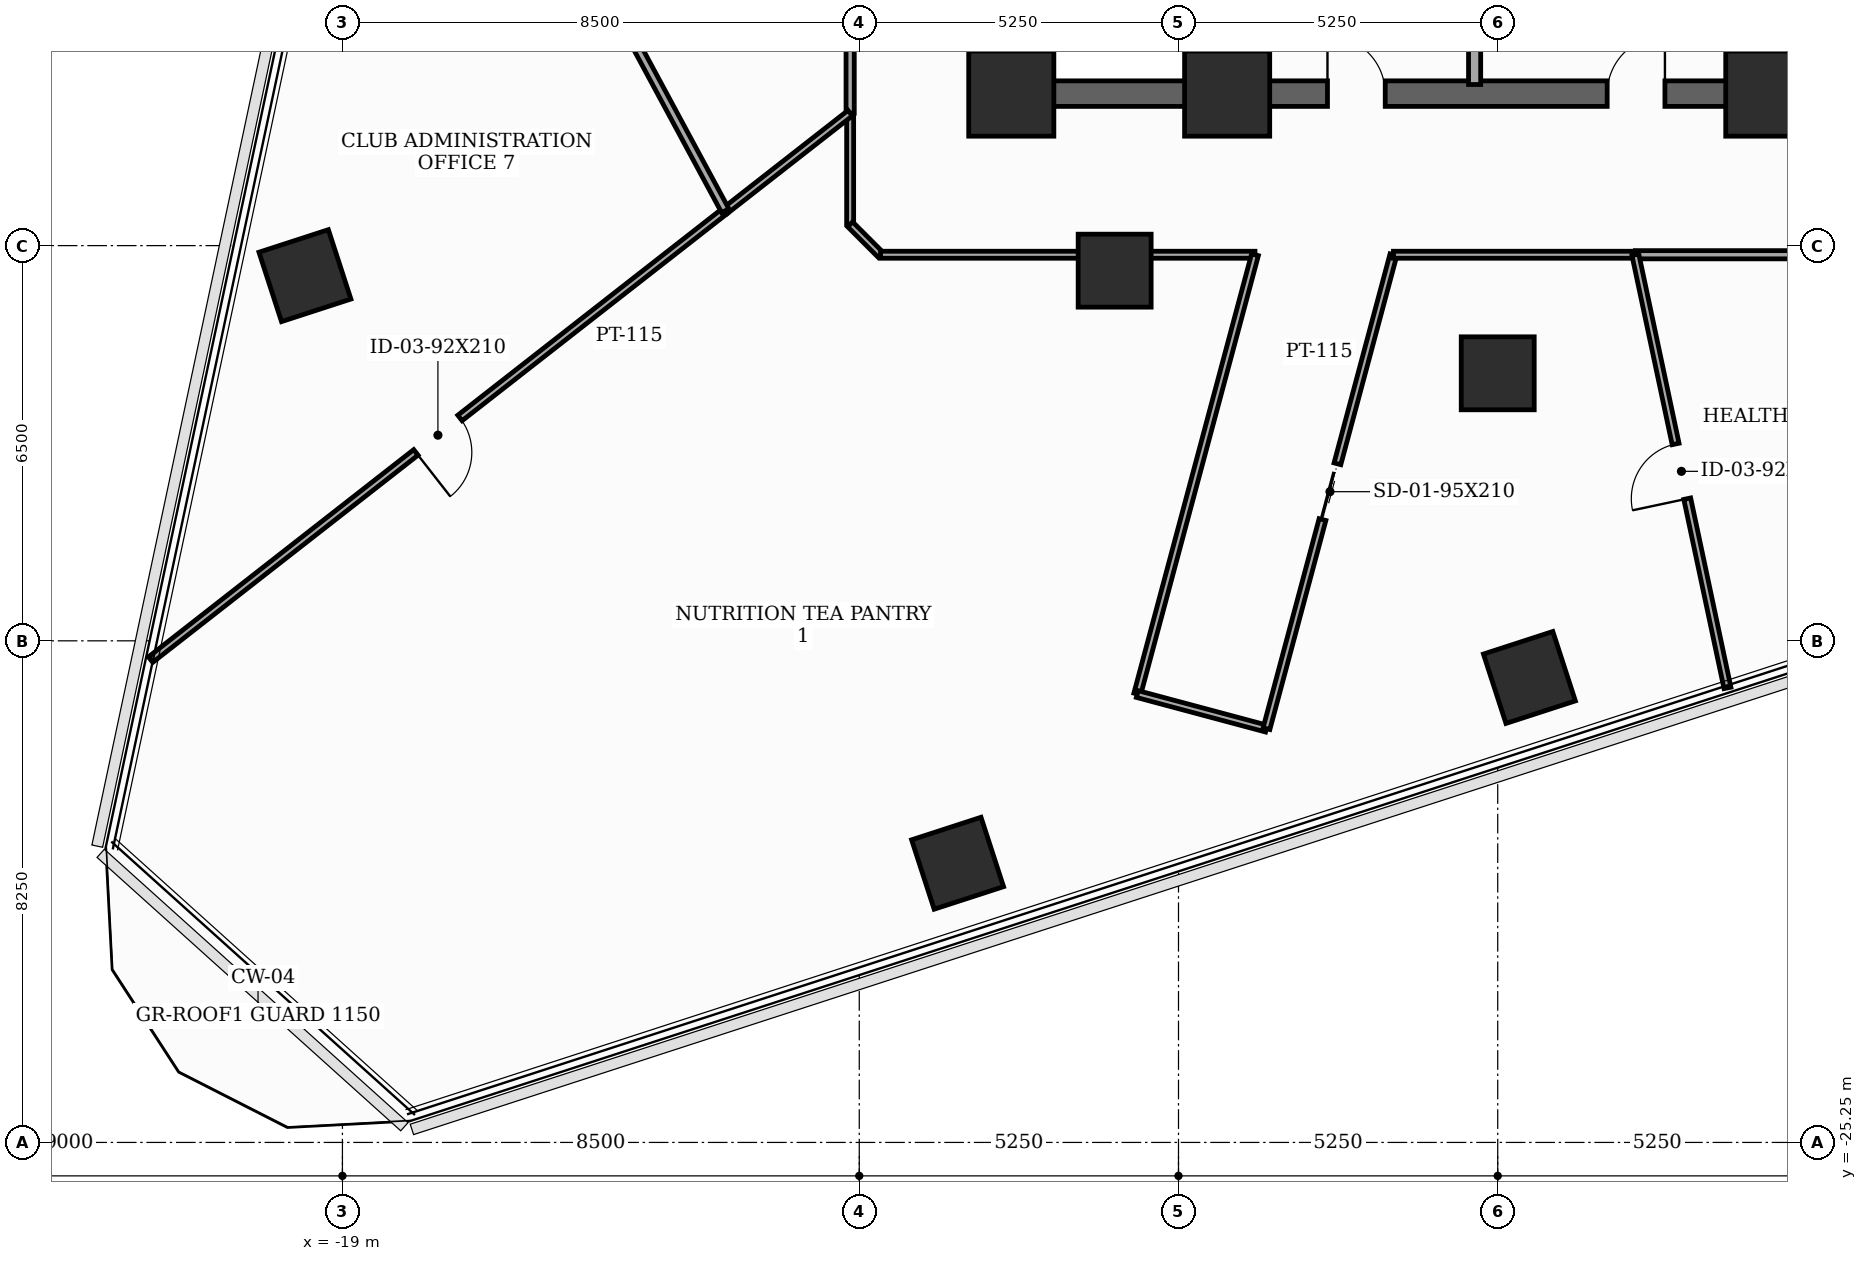
"""IFC4 building model, lengths in metres.
Left out: names, types, materials, properties, quantities, classifications, styles, units other than length and angle.
Written with IfcOpenShell. Run it as: python <this file> out.ifc"""

import sys

from ifc_helpers import new_model, si_unit, direction, frame, frame_2d, origin, origin_2d, place, context, subcontext, project, spatial, rectangle, extrude, element, fill, save


model = new_model("IFC4")
c1 = context("Model", 3, precision=1e-05, world=origin(), true_north=direction((0.0, 1.0)))
c2 = subcontext(c1, "Body", "Model", "MODEL_VIEW")
j1 = project(units=[si_unit("LENGTHUNIT", "METRE"), si_unit("PLANEANGLEUNIT", "RADIAN")], contexts=[c1])
p1 = place(None, origin())
s1 = spatial("IfcSite", under=j1, at=p1, CompositionType="ELEMENT")
p2 = place(p1, origin())
s2 = spatial("IfcBuilding", under=s1, at=p2, CompositionType="ELEMENT")
p3 = place(p2, frame((0.0, 0.0, 101.4)))
s3 = spatial("IfcBuildingStorey", under=s2, at=p3, CompositionType="ELEMENT", Elevation=101.4)
for number, where, z_axis, x_axis in (
    (1, (-8.0, -8.0, 0.0), (0.0, 0.0, 1.0), (1.0, 0.0, 0.0)),
    (2, (-4.45, -8.0, 0.0), (0.0, 0.0, 1.0), (1.0, 0.0, 0.0)),
    (3, (4.45, -8.0, 0.0), (0.0, 0.0, 1.0), (1.0, 0.0, 0.0)),
):
    element("IfcColumn", number, at=place(p3, frame(where, z_axis=z_axis, x_axis=x_axis)), inside=s3, PredefinedType="COLUMN", context=c2, shape_type="SweptSolid", body=[
        extrude(rectangle(XDim=1.4, YDim=1.4, at=origin_2d()), origin(), (0.0, 0.0, 1.0), 3.7),
    ])
for number, where, z_axis, x_axis in (
    (4, (-6.3, -10.912, 0.0), (0.0, 0.0, 1.0), (1.0, 0.0, 0.0)),
    (5, (0.0, -12.6, 0.0), (0.0, 0.0, 1.0), (1.0, 0.0, 0.0)),
    (6, (-8.883, -20.658, 0.0), (0.0, 0.0, 1.0), (0.951, 0.309, 0.0)),
    (7, (0.521, -17.603, 0.0), (0.0, 0.0, 1.0), (0.951, 0.309, 0.0)),
    (8, (-19.616, -10.994, 0.0), (0.0, 0.0, 1.0), (0.951, 0.309, 0.0)),
):
    element("IfcColumn", number, at=place(p3, frame(where, z_axis=z_axis, x_axis=x_axis)), inside=s3, PredefinedType="COLUMN", context=c2, shape_type="SweptSolid", body=[
        extrude(rectangle(XDim=1.2, YDim=1.2, at=origin_2d()), origin(), (0.0, 0.0, 1.0), 3.7),
    ])
p4 = place(p3, frame((-8.0, -8.0, 0.0), z_axis=(0.0, 0.0, 1.0), x_axis=(0.0, 1.0, 0.0)))
e9 = element("IfcWall", 9, at=p4, inside=s3, PredefinedType="SHEAR", context=c2, shape_type="SweptSolid", body=[
    extrude(rectangle(XDim=16.0, YDim=0.42, at=frame_2d((8.0, 0.0))), origin(), (0.0, 0.0, 1.0), 3.5),
])
p5 = place(p4, frame((0.922, 0.0, 0.0)))
e10 = element("IfcOpeningElement", 10, at=p5, cuts=e9, PredefinedType="OPENING", context=c2, shape_type="SweptSolid", body=[
    extrude(rectangle(XDim=0.85, YDim=2.02, at=frame_2d((0.425, 1.01))), frame((0.0, 0.22, 0.0), z_axis=(0.0, -1.0, 0.0), x_axis=(1.0, 0.0, 0.0)), (0.0, 0.0, 1.0), 0.44),
])
p6 = place(p4, frame((5.35, 0.0, 0.0)))
e11 = element("IfcOpeningElement", 11, at=p6, cuts=e9, PredefinedType="OPENING", context=c2, shape_type="SweptSolid", body=[
    extrude(rectangle(XDim=1.05, YDim=2.15, at=frame_2d((0.525, 1.075))), frame((0.0, 0.22, 0.0), z_axis=(0.0, -1.0, 0.0), x_axis=(1.0, 0.0, 0.0)), (0.0, 0.0, 1.0), 0.44),
])
p7 = place(p3, frame((-8.0, -8.0, 0.0), z_axis=(0.0, 0.0, 1.0), x_axis=(1.0, 0.0, 0.0)))
e12 = element("IfcWall", 12, at=p7, inside=s3, PredefinedType="SHEAR", context=c2, shape_type="SweptSolid", body=[
    extrude(rectangle(XDim=16.0, YDim=0.42, at=frame_2d((8.0, 0.0))), origin(), (0.0, 0.0, 1.0), 3.5),
])
p8 = place(p7, frame((5.2, 0.0, 0.0)))
e13 = element("IfcOpeningElement", 13, at=p8, cuts=e12, PredefinedType="OPENING", context=c2, shape_type="SweptSolid", body=[
    extrude(rectangle(XDim=0.95, YDim=2.1, at=frame_2d((0.475, 1.05))), frame((0.0, 0.22, 0.0), z_axis=(0.0, -1.0, 0.0), x_axis=(1.0, 0.0, 0.0)), (0.0, 0.0, 1.0), 0.44),
])
p9 = place(p7, frame((9.8, 0.0, 0.0)))
e14 = element("IfcOpeningElement", 14, at=p9, cuts=e12, PredefinedType="OPENING", context=c2, shape_type="SweptSolid", body=[
    extrude(rectangle(XDim=0.95, YDim=2.1, at=frame_2d((0.475, 1.05))), frame((0.0, 0.22, 0.0), z_axis=(0.0, -1.0, 0.0), x_axis=(1.0, 0.0, 0.0)), (0.0, 0.0, 1.0), 0.44),
])
for number, where, z_axis, x_axis in (
    (15, (-4.45, -7.79, 0.0), (0.0, 0.0, 1.0), (0.0, 1.0, 0.0)),
    (16, (4.45, -7.79, 0.0), (0.0, 0.0, 1.0), (0.0, 1.0, 0.0)),
):
    element("IfcWall", number, at=place(p3, frame(where, z_axis=z_axis, x_axis=x_axis)), inside=s3, PredefinedType="SHEAR", context=c2, shape_type="SweptSolid", body=[
        extrude(rectangle(XDim=15.58, YDim=0.3, at=frame_2d((7.79, 0.0))), origin(), (0.0, 0.0, 1.0), 3.5),
    ])
p10 = place(p3, frame((4.45, -7.26, 0.0), z_axis=(0.0, 0.0, 1.0), x_axis=(1.0, 0.0, 0.0)))
e17 = element("IfcWall", 17, at=p10, inside=s3, PredefinedType="SHEAR", context=c2, shape_type="SweptSolid", body=[
    extrude(rectangle(XDim=3.55, YDim=0.3, at=frame_2d((1.775, 0.0))), origin(), (0.0, 0.0, 1.0), 3.5),
])
p11 = place(p3, frame((-0.38, -7.85, 0.0), z_axis=(0.0, 0.0, 1.0), x_axis=(0.0, 1.0, 0.0)))
e18 = element("IfcWall", 18, at=p11, inside=s3, PredefinedType="SOLIDWALL", context=c2, shape_type="SweptSolid", body=[
    extrude(rectangle(XDim=2.95, YDim=0.2, at=frame_2d((1.475, 0.0))), origin(), (0.0, 0.0, 1.0), 2.885),
])
p12 = place(p3, frame((-10.65, -8.321, 0.0), z_axis=(0.0, 0.0, 1.0), x_axis=(0.0, -1.0, 0.0)))
e19 = element("IfcWall", 19, at=p12, inside=s3, PredefinedType="PARTITIONING", context=c2, shape_type="SweptSolid", body=[
    extrude(rectangle(XDim=1.829, YDim=0.115, at=frame_2d((0.915, 0.0))), origin(), (0.0, 0.0, 1.0), 3.5),
])
p13 = place(p3, frame((-10.65, -10.15, 0.0), z_axis=(0.0, 0.0, 1.0), x_axis=(0.707106781187, -0.707106781187, 0.0)))
e20 = element("IfcWall", 20, at=p13, inside=s3, PredefinedType="PARTITIONING", context=c2, shape_type="SweptSolid", body=[
    extrude(rectangle(XDim=0.707, YDim=0.115, at=frame_2d((0.354, 0.0))), origin(), (0.0, 0.0, 1.0), 3.5),
])
p14 = place(p3, frame((-10.15, -10.65, 0.0), z_axis=(0.0, 0.0, 1.0), x_axis=(1.0, 0.0, 0.0)))
e21 = element("IfcWall", 21, at=p14, inside=s3, PredefinedType="PARTITIONING", context=c2, shape_type="SweptSolid", body=[
    extrude(rectangle(XDim=6.158, YDim=0.115, at=frame_2d((3.079, 0.0))), origin(), (0.0, 0.0, 1.0), 2.785),
])
p15 = place(p3, frame((-3.992, -10.65, 0.0), z_axis=(0.0, 0.0, 1.0), x_axis=(-0.258828534142, -0.965923283659, 0.0)))
e22 = element("IfcWall", 22, at=p15, inside=s3, PredefinedType="PARTITIONING", context=c2, shape_type="SweptSolid", body=[
    extrude(rectangle(XDim=7.48, YDim=0.115, at=frame_2d((3.74, 0.0))), origin(), (0.0, 0.0, 1.0), 2.785),
])
p16 = place(p3, frame((-5.928, -17.875, 0.0), z_axis=(0.0, 0.0, 1.0), x_axis=(0.965959937537, -0.258691706618, 0.0)))
e23 = element("IfcWall", 23, at=p16, inside=s3, PredefinedType="PARTITIONING", context=c2, shape_type="SweptSolid", body=[
    extrude(rectangle(XDim=2.2, YDim=0.115, at=frame_2d((1.1, 0.0))), origin(), (0.0, 0.0, 1.0), 3.5),
])
p17 = place(p3, frame((-3.803, -18.444, 0.0), z_axis=(0.0, 0.0, 1.0), x_axis=(0.258754737882, 0.965943055062, 0.0)))
e24 = element("IfcWall", 24, at=p17, inside=s3, PredefinedType="PARTITIONING", context=c2, shape_type="SweptSolid", body=[
    extrude(rectangle(XDim=8.069, YDim=0.115, at=frame_2d((4.035, 0.0))), origin(), (0.0, 0.0, 1.0), 2.785),
])
p18 = place(p17, frame((3.559, 0.0, 0.0)))
e25 = element("IfcOpeningElement", 25, at=p18, cuts=e24, PredefinedType="OPENING", context=c2, shape_type="SweptSolid", body=[
    extrude(rectangle(XDim=0.95, YDim=2.1, at=frame_2d((0.475, 1.05))), frame((0.0, 0.067, 0.0), z_axis=(0.0, -1.0, 0.0), x_axis=(1.0, 0.0, 0.0)), (0.0, 0.0, 1.0), 0.135),
])
p19 = place(p3, frame((-1.715, -10.65, 0.0), z_axis=(0.0, 0.0, 1.0), x_axis=(1.0, 0.0, 0.0)))
e26 = element("IfcWall", 26, at=p19, inside=s3, PredefinedType="PARTITIONING", context=c2, shape_type="SweptSolid", body=[
    extrude(rectangle(XDim=3.979, YDim=0.115, at=frame_2d((1.99, 0.0))), origin(), (0.0, 0.0, 1.0), 2.785),
])
p20 = place(p3, frame((-10.65, -4.85, 0.0), z_axis=(0.0, 0.0, 1.0), x_axis=(0.0, -1.0, 0.0)))
e27 = element("IfcWall", 27, at=p20, inside=s3, PredefinedType="PARTITIONING", context=c2, shape_type="SweptSolid", body=[
    extrude(rectangle(XDim=3.471, YDim=0.135, at=frame_2d((1.735, 0.0))), origin(), (0.0, 0.0, 1.0), 2.785),
])
p21 = place(p3, frame((2.264, -10.65, 0.0), z_axis=(0.0, 0.0, 1.0), x_axis=(1.0, 0.0, 0.0)))
e28 = element("IfcWall", 28, at=p21, inside=s3, PredefinedType="PARTITIONING", context=c2, shape_type="SweptSolid", body=[
    extrude(rectangle(XDim=7.886, YDim=0.135, at=frame_2d((3.943, 0.0))), origin(), (0.0, 0.0, 1.0), 2.785),
])
p22 = place(p3, frame((-10.65, -8.321, 0.0), z_axis=(0.0, 0.0, 1.0), x_axis=(-0.787998815749, -0.615676754782, 0.0)))
e29 = element("IfcWall", 29, at=p22, inside=s3, PredefinedType="PARTITIONING", context=c2, shape_type="SweptSolid", body=[
    extrude(rectangle(XDim=2.607, YDim=0.115, at=frame_2d((1.303, 0.0))), origin(), (0.0, 0.0, 1.0), 3.5),
])
p23 = place(p3, frame((-12.704, -9.926, 0.0), z_axis=(0.0, 0.0, 1.0), x_axis=(-0.788033940978, -0.615631795692, 0.0)))
e30 = element("IfcWall", 30, at=p23, inside=s3, PredefinedType="PARTITIONING", context=c2, shape_type="SweptSolid", body=[
    extrude(rectangle(XDim=11.993, YDim=0.115, at=frame_2d((5.997, 0.0))), origin(), (0.0, 0.0, 1.0), 2.935),
])
p24 = place(p23, frame((5.537, 0.0, 0.0)))
e31 = element("IfcOpeningElement", 31, at=p24, cuts=e30, PredefinedType="OPENING", context=c2, shape_type="SweptSolid", body=[
    extrude(rectangle(XDim=0.92, YDim=2.1, at=frame_2d((0.46, 1.05))), frame((0.0, 0.067, 0.0), z_axis=(0.0, -1.0, 0.0), x_axis=(1.0, 0.0, 0.0)), (0.0, 0.0, 1.0), 0.135),
])
p25 = place(p3, frame((3.778, -17.774, 0.0), z_axis=(0.0, 0.0, 1.0), x_axis=(-0.207917284361, 0.978146411773, 0.0)))
e32 = element("IfcWall", 32, at=p25, inside=s3, PredefinedType="PARTITIONING", context=c2, shape_type="SweptSolid", body=[
    extrude(rectangle(XDim=7.284, YDim=0.115, at=frame_2d((3.642, 0.0))), origin(), (0.0, 0.0, 1.0), 2.785),
])
p26 = place(p25, frame((3.182, 0.0, 0.0)))
e33 = element("IfcOpeningElement", 33, at=p26, cuts=e32, PredefinedType="OPENING", context=c2, shape_type="SweptSolid", body=[
    extrude(rectangle(XDim=0.92, YDim=2.1, at=frame_2d((0.46, 1.05))), frame((0.0, 0.067, 0.0), z_axis=(0.0, -1.0, 0.0), x_axis=(1.0, 0.0, 0.0)), (0.0, 0.0, 1.0), 0.135),
])
p27 = place(p3, frame((-15.478, -4.781, 0.0), z_axis=(0.0, 0.0, 1.0), x_axis=(0.47456801742, -0.880218834633, 0.0)))
e34 = element("IfcWall", 34, at=p27, inside=s3, PredefinedType="PARTITIONING", context=c2, shape_type="SweptSolid", body=[
    extrude(rectangle(XDim=5.845, YDim=0.135, at=frame_2d((2.923, 0.0))), origin(), (0.0, 0.0, 1.0), 2.785),
])
p28 = place(p8, origin())
e35 = element("IfcDoor", 35, at=p28, inside=s3, OperationType="SINGLE_SWING_LEFT", PredefinedType="DOOR", context=c2, shape_type="SweptSolid", body=[
    extrude(rectangle(XDim=0.95, YDim=2.1, at=frame_2d((0.475, 1.05))), frame((0.0, 0.025, 0.0), z_axis=(0.0, -1.0, 0.0), x_axis=(1.0, 0.0, 0.0)), (0.0, 0.0, 1.0), 0.05),
])
fill(e13, e35)
p29 = place(p9, origin())
e36 = element("IfcDoor", 36, at=p29, inside=s3, OperationType="SINGLE_SWING_RIGHT", PredefinedType="DOOR", context=c2, shape_type="SweptSolid", body=[
    extrude(rectangle(XDim=0.95, YDim=2.1, at=frame_2d((0.475, 1.05))), frame((0.0, 0.025, 0.0), z_axis=(0.0, -1.0, 0.0), x_axis=(1.0, 0.0, 0.0)), (0.0, 0.0, 1.0), 0.05),
])
fill(e14, e36)
p30 = place(p18, origin())
e37 = element("IfcDoor", 37, at=p30, inside=s3, OperationType="SLIDING_TO_LEFT", PredefinedType="DOOR", context=c2, shape_type="SweptSolid", body=[
    extrude(rectangle(XDim=0.95, YDim=2.1, at=frame_2d((0.475, 1.05))), frame((0.0, 0.025, 0.0), z_axis=(0.0, -1.0, 0.0), x_axis=(1.0, 0.0, 0.0)), (0.0, 0.0, 1.0), 0.05),
])
fill(e25, e37)
p31 = place(p24, origin())
e38 = element("IfcDoor", 38, at=p31, inside=s3, OperationType="SINGLE_SWING_RIGHT", PredefinedType="DOOR", context=c2, shape_type="SweptSolid", body=[
    extrude(rectangle(XDim=0.92, YDim=2.1, at=frame_2d((0.46, 1.05))), frame((0.0, 0.025, 0.0), z_axis=(0.0, -1.0, 0.0), x_axis=(1.0, 0.0, 0.0)), (0.0, 0.0, 1.0), 0.05),
])
fill(e31, e38)
p32 = place(p26, origin())
e39 = element("IfcDoor", 39, at=p32, inside=s3, OperationType="SINGLE_SWING_LEFT", PredefinedType="DOOR", context=c2, shape_type="SweptSolid", body=[
    extrude(rectangle(XDim=0.92, YDim=2.1, at=frame_2d((0.46, 1.05))), frame((0.0, 0.025, 0.0), z_axis=(0.0, -1.0, 0.0), x_axis=(1.0, 0.0, 0.0)), (0.0, 0.0, 1.0), 0.05),
])
fill(e33, e39)
save(model, sys.argv[1])
